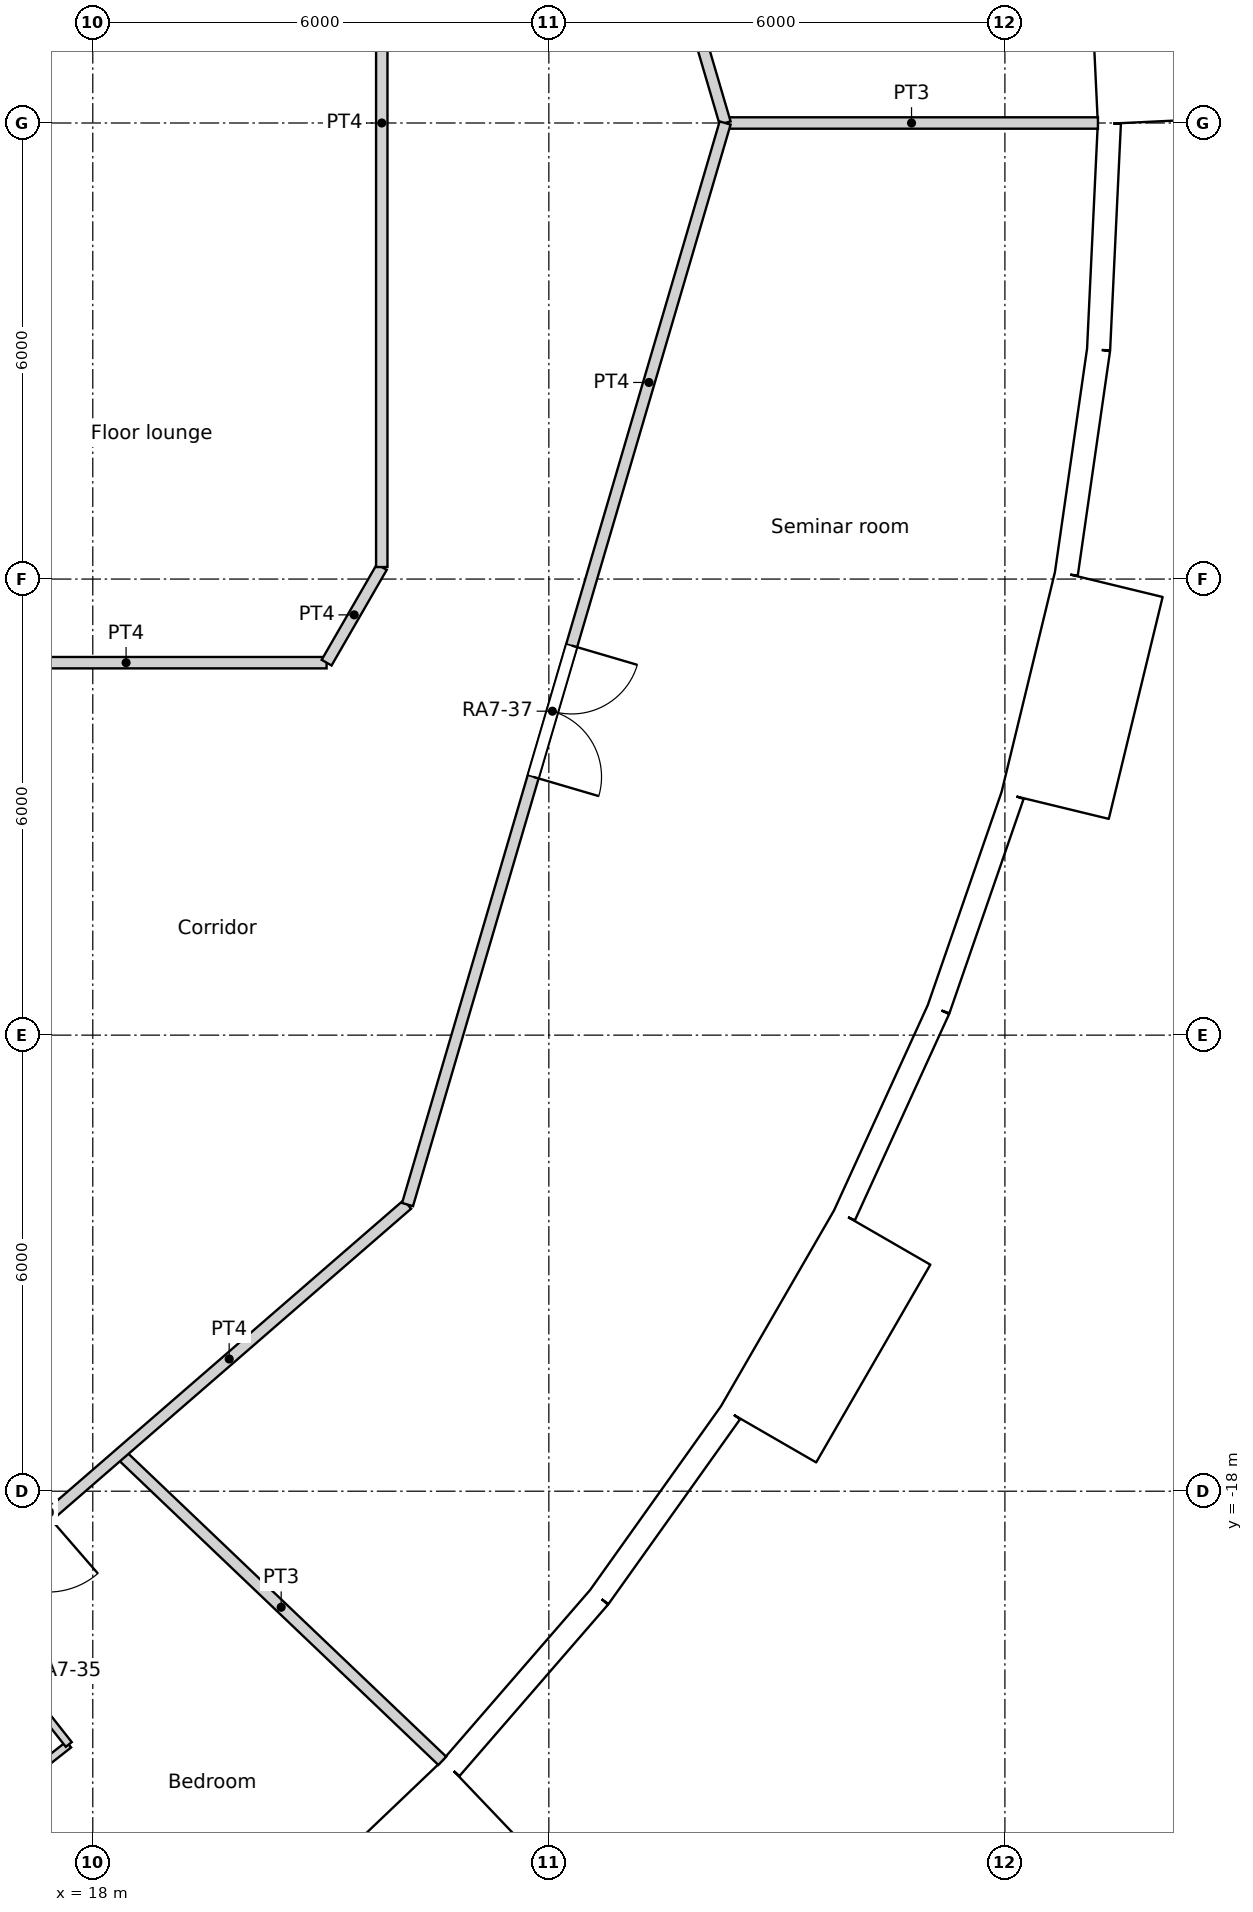
"""IFC4 building model, lengths in metres.
Left out: names, types, materials, properties, quantities, classifications, styles, units other than length and angle.
Written with IfcOpenShell. Run it as: python <this file> out.ifc"""

import sys

from ifc_helpers import new_model, si_unit, direction, frame, frame_2d, origin, origin_2d, place, context, subcontext, project, spatial, rectangle, circle, extrude, element, fill, save


model = new_model("IFC4")
c1 = context("Model", 3, precision=1e-05, world=origin(), true_north=direction((0.0, 1.0)))
c2 = subcontext(c1, "Body", "Model", "MODEL_VIEW")
j1 = project(units=[si_unit("LENGTHUNIT", "METRE"), si_unit("PLANEANGLEUNIT", "RADIAN")], contexts=[c1])
p1 = place(None, origin())
s1 = spatial("IfcSite", under=j1, at=p1, CompositionType="ELEMENT")
p2 = place(p1, origin())
s2 = spatial("IfcBuilding", under=s1, at=p2, CompositionType="ELEMENT")
p3 = place(p2, frame((0.0, 0.0, 93.0)))
s3 = spatial("IfcBuildingStorey", under=s2, at=p3, CompositionType="ELEMENT", Elevation=93.0)
for number, where, z_axis, x_axis in (
    (1, (30.275, 0.0, 0.0), (0.0, 0.0, 1.0), (1.0, 0.0, 0.0)),
    (2, (21.911, -20.892, 0.0), (0.0, 0.0, 1.0), (1.0, 0.0, 0.0)),
    (3, (25.469, -16.368, 0.0), (0.0, 0.0, 1.0), (1.0, 0.0, 0.0)),
    (4, (28.106, -11.252, 0.0), (0.0, 0.0, 1.0), (1.0, 0.0, 0.0)),
    (5, (29.728, -5.729, 0.0), (0.0, 0.0, 1.0), (1.0, 0.0, 0.0)),
):
    element("IfcColumn", number, at=place(p3, frame(where, z_axis=z_axis, x_axis=x_axis)), inside=s3, PredefinedType="COLUMN", context=c2, shape_type="SweptSolid", body=[
        extrude(circle(Radius=0.6, at=origin_2d()), origin(), (0.0, 0.0, 1.0), 3.6),
    ])
for number, where, z_axis, x_axis in (
    (6, (24.548, 0.0, 0.0), (0.0, 0.0, 1.0), (1.0, 0.0, 0.0)),
    (7, (18.805, -15.779, 0.0), (0.0, 0.0, 1.0), (1.0, 0.0, 0.0)),
    (8, (21.937, -11.017, 0.0), (0.0, 0.0, 1.0), (1.0, 0.0, 0.0)),
    (9, (23.886, -5.661, 0.0), (0.0, 0.0, 1.0), (1.0, 0.0, 0.0)),
):
    element("IfcColumn", number, at=place(p3, frame(where, z_axis=z_axis, x_axis=x_axis)), inside=s3, PredefinedType="COLUMN", context=c2, shape_type="SweptSolid", body=[
        extrude(circle(Radius=0.65, at=origin_2d()), origin(), (0.0, 0.0, 1.0), 3.6),
    ])
for number, where, z_axis, x_axis in (
    (10, (18.822, 0.0, 0.0), (0.0, 0.0, 1.0), (1.0, 0.0, 0.0)),
    (11, (17.986, -5.548, 0.0), (0.0, 0.0, 1.0), (1.0, 0.0, 0.0)),
):
    element("IfcColumn", number, at=place(p3, frame(where, z_axis=z_axis, x_axis=x_axis)), inside=s3, PredefinedType="COLUMN", context=c2, shape_type="SweptSolid", body=[
        extrude(circle(Radius=0.7, at=origin_2d()), origin(), (0.0, 0.0, 1.0), 3.6),
    ])
p4 = place(p3, frame((31.949, 0.02, -0.45), z_axis=(0.0, 0.0, 1.0), x_axis=(-0.047607680889, 0.998866111509, 0.0)))
e12 = element("IfcWall", 12, at=p4, inside=s3, PredefinedType="ELEMENTEDWALL", context=c2, shape_type="SweptSolid", body=[
    extrude(rectangle(XDim=3.0, YDim=1.45, at=frame_2d((1.5, 0.0))), origin(), (0.0, 0.0, 1.0), 3.6),
])
p5 = place(p4, frame((1.5, 0.0, 2.0)))
e13 = element("IfcOpeningElement", 13, at=p5, cuts=e12, PredefinedType="OPENING", context=c2, shape_type="SweptSolid", body=[
    extrude(circle(Radius=0.9, at=origin_2d()), frame((0.0, 0.735, 0.0), z_axis=(0.0, -1.0, 0.0), x_axis=(1.0, 0.0, 0.0)), (0.0, 0.0, 1.0), 1.47),
])
p6 = place(p3, frame((20.938, -24.132, -0.45), z_axis=(0.0, 0.0, 1.0), x_axis=(0.723712023899, 0.690102098579, 0.0)))
e14 = element("IfcWall", 14, at=p6, inside=s3, PredefinedType="ELEMENTEDWALL", context=c2, shape_type="SweptSolid", body=[
    extrude(rectangle(XDim=3.0, YDim=1.45, at=frame_2d((1.5, 0.0))), origin(), (0.0, 0.0, 1.0), 3.6),
])
p7 = place(p6, frame((1.5, 0.0, 2.0)))
e15 = element("IfcOpeningElement", 15, at=p7, cuts=e14, PredefinedType="OPENING", context=c2, shape_type="SweptSolid", body=[
    extrude(circle(Radius=0.9, at=origin_2d()), frame((0.0, 0.735, 0.0), z_axis=(0.0, -1.0, 0.0), x_axis=(1.0, 0.0, 0.0)), (0.0, 0.0, 1.0), 1.47),
])
p8 = place(p3, frame((22.711, -21.646, 0.0), z_axis=(0.0, 0.0, 1.0), x_axis=(0.654830712471, 0.755775587066, 0.0)))
e16 = element("IfcWall", 16, at=p8, inside=s3, PredefinedType="SOLIDWALL", context=c2, shape_type="SweptSolid", body=[
    extrude(rectangle(XDim=2.98, YDim=0.3, at=frame_2d((1.49, 0.0))), origin(), (0.0, 0.0, 1.0), 3.15),
])
p9 = place(p8, frame((1.49, 0.0, 1.55)))
e17 = element("IfcOpeningElement", 17, at=p9, cuts=e16, PredefinedType="OPENING", context=c2, shape_type="SweptSolid", body=[
    extrude(circle(Radius=0.9, at=origin_2d()), frame((0.0, 0.16, 0.0), z_axis=(0.0, -1.0, 0.0), x_axis=(1.0, 0.0, 0.0)), (0.0, 0.0, 1.0), 0.32),
])
p10 = place(p3, frame((24.662, -19.394, 0.0), z_axis=(0.0, 0.0, 1.0), x_axis=(0.580113774115, 0.814535456, 0.0)))
e18 = element("IfcWall", 18, at=p10, inside=s3, PredefinedType="SOLIDWALL", context=c2, shape_type="SweptSolid", body=[
    extrude(rectangle(XDim=2.98, YDim=0.3, at=frame_2d((1.49, 0.0))), origin(), (0.0, 0.0, 1.0), 3.15),
])
p11 = place(p10, frame((1.49, 0.0, 1.55)))
e19 = element("IfcOpeningElement", 19, at=p11, cuts=e18, PredefinedType="OPENING", context=c2, shape_type="SweptSolid", body=[
    extrude(circle(Radius=0.9, at=origin_2d()), frame((0.0, 0.16, 0.0), z_axis=(0.0, -1.0, 0.0), x_axis=(1.0, 0.0, 0.0)), (0.0, 0.0, 1.0), 0.32),
])
p12 = place(p3, frame((26.888, -17.256, -0.45), z_axis=(0.0, 0.0, 1.0), x_axis=(0.499990139034, 0.866031096941, 0.0)))
e20 = element("IfcWall", 20, at=p12, inside=s3, PredefinedType="ELEMENTEDWALL", context=c2, shape_type="SweptSolid", body=[
    extrude(rectangle(XDim=3.0, YDim=1.45, at=frame_2d((1.5, 0.0))), origin(), (0.0, 0.0, 1.0), 3.6),
])
p13 = place(p12, frame((1.5, 0.0, 2.0)))
e21 = element("IfcOpeningElement", 21, at=p13, cuts=e20, PredefinedType="OPENING", context=c2, shape_type="SweptSolid", body=[
    extrude(circle(Radius=0.9, at=origin_2d()), frame((0.0, 0.735, 0.0), z_axis=(0.0, -1.0, 0.0), x_axis=(1.0, 0.0, 0.0)), (0.0, 0.0, 1.0), 1.47),
])
p14 = place(p3, frame((27.889, -14.371, 0.0), z_axis=(0.0, 0.0, 1.0), x_axis=(0.415407317162, 0.909635509888, 0.0)))
e22 = element("IfcWall", 22, at=p14, inside=s3, PredefinedType="SOLIDWALL", context=c2, shape_type="SweptSolid", body=[
    extrude(rectangle(XDim=2.98, YDim=0.3, at=frame_2d((1.49, 0.0))), origin(), (0.0, 0.0, 1.0), 3.15),
])
p15 = place(p14, frame((1.49, 0.0, 1.55)))
e23 = element("IfcOpeningElement", 23, at=p15, cuts=e22, PredefinedType="OPENING", context=c2, shape_type="SweptSolid", body=[
    extrude(circle(Radius=0.9, at=origin_2d()), frame((0.0, 0.16, 0.0), z_axis=(0.0, -1.0, 0.0), x_axis=(1.0, 0.0, 0.0)), (0.0, 0.0, 1.0), 0.32),
])
p16 = place(p3, frame((29.127, -11.661, 0.0), z_axis=(0.0, 0.0, 1.0), x_axis=(0.327096492592, 0.944990944154, 0.0)))
e24 = element("IfcWall", 24, at=p16, inside=s3, PredefinedType="SOLIDWALL", context=c2, shape_type="SweptSolid", body=[
    extrude(rectangle(XDim=2.979, YDim=0.3, at=frame_2d((1.49, 0.0))), origin(), (0.0, 0.0, 1.0), 3.15),
])
p17 = place(p16, frame((1.49, 0.0, 1.55)))
e25 = element("IfcOpeningElement", 25, at=p17, cuts=e24, PredefinedType="OPENING", context=c2, shape_type="SweptSolid", body=[
    extrude(circle(Radius=0.9, at=origin_2d()), frame((0.0, 0.16, 0.0), z_axis=(0.0, -1.0, 0.0), x_axis=(1.0, 0.0, 0.0)), (0.0, 0.0, 1.0), 0.32),
])
p18 = place(p3, frame((30.661, -8.982, -0.45), z_axis=(0.0, 0.0, 1.0), x_axis=(0.235751415068, 0.971813392732, 0.0)))
e26 = element("IfcWall", 26, at=p18, inside=s3, PredefinedType="ELEMENTEDWALL", context=c2, shape_type="SweptSolid", body=[
    extrude(rectangle(XDim=3.0, YDim=1.45, at=frame_2d((1.5, 0.0))), origin(), (0.0, 0.0, 1.0), 3.6),
])
p19 = place(p18, frame((1.5, 0.0, 2.0)))
e27 = element("IfcOpeningElement", 27, at=p19, cuts=e26, PredefinedType="OPENING", context=c2, shape_type="SweptSolid", body=[
    extrude(circle(Radius=0.9, at=origin_2d()), frame((0.0, 0.735, 0.0), z_axis=(0.0, -1.0, 0.0), x_axis=(1.0, 0.0, 0.0)), (0.0, 0.0, 1.0), 1.47),
])
p20 = place(p3, frame((30.808, -5.932, 0.0), z_axis=(0.0, 0.0, 1.0), x_axis=(0.142327539111, 0.989819615693, 0.0)))
e28 = element("IfcWall", 28, at=p20, inside=s3, PredefinedType="SOLIDWALL", context=c2, shape_type="SweptSolid", body=[
    extrude(rectangle(XDim=2.979, YDim=0.3, at=frame_2d((1.49, 0.0))), origin(), (0.0, 0.0, 1.0), 3.15),
])
p21 = place(p20, frame((1.49, 0.0, 1.55)))
e29 = element("IfcOpeningElement", 29, at=p21, cuts=e28, PredefinedType="OPENING", context=c2, shape_type="SweptSolid", body=[
    extrude(circle(Radius=0.9, at=origin_2d()), frame((0.0, 0.16, 0.0), z_axis=(0.0, -1.0, 0.0), x_axis=(1.0, 0.0, 0.0)), (0.0, 0.0, 1.0), 0.32),
])
p22 = place(p3, frame((31.232, -2.982, 0.0), z_axis=(0.0, 0.0, 1.0), x_axis=(0.047522328113, 0.998870175914, 0.0)))
e30 = element("IfcWall", 30, at=p22, inside=s3, PredefinedType="SOLIDWALL", context=c2, shape_type="SweptSolid", body=[
    extrude(rectangle(XDim=2.98, YDim=0.3, at=frame_2d((1.49, 0.0))), origin(), (0.0, 0.0, 1.0), 3.15),
])
p23 = place(p22, frame((1.49, 0.0, 1.55)))
e31 = element("IfcOpeningElement", 31, at=p23, cuts=e30, PredefinedType="OPENING", context=c2, shape_type="SweptSolid", body=[
    extrude(circle(Radius=0.9, at=origin_2d()), frame((0.0, 0.16, 0.0), z_axis=(0.0, -1.0, 0.0), x_axis=(1.0, 0.0, 0.0)), (0.0, 0.0, 1.0), 0.32),
])
p24 = place(p3, frame((15.8, -7.1, 0.0), z_axis=(0.0, 0.0, 1.0), x_axis=(1.0, 0.0, 0.0)))
e32 = element("IfcWall", 32, at=p24, inside=s3, PredefinedType="PARTITIONING", context=c2, shape_type="SweptSolid", body=[
    extrude(rectangle(XDim=5.276, YDim=0.15, at=frame_2d((2.638, 0.0))), origin(), (0.0, 0.0, 1.0), 3.15),
])
p25 = place(p3, frame((21.076, -7.1, 0.0), z_axis=(0.0, 0.0, 1.0), x_axis=(0.499863102386, 0.866104427234, 0.0)))
e33 = element("IfcWall", 33, at=p25, inside=s3, PredefinedType="PARTITIONING", context=c2, shape_type="SweptSolid", body=[
    extrude(rectangle(XDim=1.453, YDim=0.15, at=frame_2d((0.726, 0.0))), origin(), (0.0, 0.0, 1.0), 3.15),
])
p26 = place(p3, frame((21.802, -5.842, 0.0), z_axis=(0.0, 0.0, 1.0), x_axis=(0.0, 1.0, 0.0)))
e34 = element("IfcWall", 34, at=p26, inside=s3, PredefinedType="PARTITIONING", context=c2, shape_type="SweptSolid", body=[
    extrude(rectangle(XDim=11.684, YDim=0.15, at=frame_2d((5.842, 0.0))), origin(), (0.0, 0.0, 1.0), 3.15),
])
p27 = place(p3, frame((22.14, 14.229, 0.0), z_axis=(0.0, 0.0, 1.0), x_axis=(0.281780364869, -0.959478934617, 0.0)))
e35 = element("IfcWall", 35, at=p27, inside=s3, PredefinedType="PARTITIONING", context=c2, shape_type="SweptSolid", body=[
    extrude(rectangle(XDim=14.83, YDim=0.15, at=frame_2d((7.415, 0.0))), origin(), (0.0, 0.0, 1.0), 3.15),
])
p28 = place(p27, frame((9.764, 0.0, 0.0)))
e36 = element("IfcOpeningElement", 36, at=p28, cuts=e35, PredefinedType="OPENING", context=c2, shape_type="SweptSolid", body=[
    extrude(rectangle(XDim=1.8, YDim=2.1, at=frame_2d((0.9, 1.05))), frame((0.0, 0.075, 0.0), z_axis=(0.0, -1.0, 0.0), x_axis=(1.0, 0.0, 0.0)), (0.0, 0.0, 1.0), 0.15),
])
p29 = place(p27, frame((0.554, 0.0, 0.0)))
e37 = element("IfcOpeningElement", 37, at=p29, cuts=e35, PredefinedType="OPENING", context=c2, shape_type="SweptSolid", body=[
    extrude(rectangle(XDim=1.8, YDim=2.1, at=frame_2d((0.9, 1.05))), frame((0.0, 0.075, 0.0), z_axis=(0.0, -1.0, 0.0), x_axis=(1.0, 0.0, 0.0)), (0.0, 0.0, 1.0), 0.15),
])
p30 = place(p3, frame((13.247, -21.939, 0.0), z_axis=(0.0, 0.0, 1.0), x_axis=(0.755420750547, 0.655240024451, 0.0)))
e38 = element("IfcWall", 38, at=p30, inside=s3, PredefinedType="PARTITIONING", context=c2, shape_type="SweptSolid", body=[
    extrude(rectangle(XDim=11.771, YDim=0.15, at=frame_2d((5.885, 0.0))), origin(), (0.0, 0.0, 1.0), 3.15),
])
p31 = place(p30, frame((4.513, 0.0, 0.0)))
e39 = element("IfcOpeningElement", 39, at=p31, cuts=e38, PredefinedType="OPENING", context=c2, shape_type="SweptSolid", body=[
    extrude(rectangle(XDim=1.0, YDim=2.1, at=frame_2d((0.5, 1.05))), frame((0.0, 0.075, 0.0), z_axis=(0.0, -1.0, 0.0), x_axis=(1.0, 0.0, 0.0)), (0.0, 0.0, 1.0), 0.15),
])
p32 = place(p3, frame((22.141, -14.229, 0.0), z_axis=(0.0, 0.0, 1.0), x_axis=(0.281730446162, 0.959493593363, 0.0)))
e40 = element("IfcWall", 40, at=p32, inside=s3, PredefinedType="PARTITIONING", context=c2, shape_type="SweptSolid", body=[
    extrude(rectangle(XDim=14.83, YDim=0.15, at=frame_2d((7.415, 0.0))), origin(), (0.0, 0.0, 1.0), 3.15),
])
p33 = place(p32, frame((5.865, 0.0, 0.0)))
e41 = element("IfcOpeningElement", 41, at=p33, cuts=e40, PredefinedType="OPENING", context=c2, shape_type="SweptSolid", body=[
    extrude(rectangle(XDim=1.8, YDim=2.1, at=frame_2d((0.9, 1.05))), frame((0.0, 0.075, 0.0), z_axis=(0.0, -1.0, 0.0), x_axis=(1.0, 0.0, 0.0)), (0.0, 0.0, 1.0), 0.15),
])
p34 = place(p3, frame((26.319, 0.0, 0.0), z_axis=(0.0, 0.0, 1.0), x_axis=(1.0, 0.0, 0.0)))
e42 = element("IfcWall", 42, at=p34, inside=s3, PredefinedType="PARTITIONING", context=c2, shape_type="SweptSolid", body=[
    extrude(rectangle(XDim=4.905, YDim=0.15, at=frame_2d((2.453, 0.0))), origin(), (0.0, 0.0, 1.0), 3.15),
])
p35 = place(p3, frame((14.715, -20.664, 0.0), z_axis=(0.0, 0.0, 1.0), x_axis=(0.57995989616, -0.814645026282, 0.0)))
e43 = element("IfcWall", 43, at=p35, inside=s3, PredefinedType="PARTITIONING", context=c2, shape_type="SweptSolid", body=[
    extrude(rectangle(XDim=5.857, YDim=0.15, at=frame_2d((2.928, 0.0))), origin(), (0.0, 0.0, 1.0), 3.15),
])
p36 = place(p3, frame((16.086, -22.589, 0.0), z_axis=(0.0, 0.0, 1.0), x_axis=(0.785984904201, 0.618245687707, 0.0)))
e44 = element("IfcWall", 44, at=p36, inside=s3, PredefinedType="PARTITIONING", context=c2, shape_type="SweptSolid", body=[
    extrude(rectangle(XDim=2.033, YDim=0.1, at=frame_2d((1.017, 0.0))), origin(), (0.0, 0.0, 1.0), 3.15),
])
p37 = place(p3, frame((16.168, -19.404, 0.0), z_axis=(0.0, 0.0, 1.0), x_axis=(0.618142414415, -0.786066126672, 0.0)))
e45 = element("IfcWall", 45, at=p37, inside=s3, PredefinedType="PARTITIONING", context=c2, shape_type="SweptSolid", body=[
    extrude(rectangle(XDim=2.453, YDim=0.1, at=frame_2d((1.226, 0.0))), origin(), (0.0, 0.0, 1.0), 3.15),
])
p38 = place(p37, frame((0.777, 0.0, 0.0)))
e46 = element("IfcOpeningElement", 46, at=p38, cuts=e45, PredefinedType="OPENING", context=c2, shape_type="SweptSolid", body=[
    extrude(rectangle(XDim=0.9, YDim=2.04, at=frame_2d((0.45, 1.02))), frame((0.0, 0.05, 0.0), z_axis=(0.0, -1.0, 0.0), x_axis=(1.0, 0.0, 0.0)), (0.0, 0.0, 1.0), 0.1),
])
p39 = place(p3, frame((18.359, -17.506, 0.0), z_axis=(0.0, 0.0, 1.0), x_axis=(0.723808715798, -0.690000683286, 0.0)))
e47 = element("IfcWall", 47, at=p39, inside=s3, PredefinedType="PARTITIONING", context=c2, shape_type="SweptSolid", body=[
    extrude(rectangle(XDim=5.856, YDim=0.15, at=frame_2d((2.928, 0.0))), origin(), (0.0, 0.0, 1.0), 3.15),
])
p40 = place(p5, origin())
e48 = element("IfcWindow", 48, at=p40, inside=s3, PartitioningType="SINGLE_PANEL", PredefinedType="WINDOW", context=c2, shape_type="SweptSolid", body=[
    extrude(circle(Radius=0.9, at=origin_2d()), frame((0.0, 0.695, 0.0), z_axis=(0.0, -1.0, 0.0), x_axis=(1.0, 0.0, 0.0)), (0.0, 0.0, 1.0), 0.1),
])
fill(e13, e48)
p41 = place(p7, origin())
e49 = element("IfcWindow", 49, at=p41, inside=s3, PartitioningType="SINGLE_PANEL", PredefinedType="WINDOW", context=c2, shape_type="SweptSolid", body=[
    extrude(circle(Radius=0.9, at=origin_2d()), frame((0.0, 0.695, 0.0), z_axis=(0.0, -1.0, 0.0), x_axis=(1.0, 0.0, 0.0)), (0.0, 0.0, 1.0), 0.1),
])
fill(e15, e49)
p42 = place(p9, origin())
e50 = element("IfcWindow", 50, at=p42, inside=s3, PartitioningType="SINGLE_PANEL", PredefinedType="WINDOW", context=c2, shape_type="SweptSolid", body=[
    extrude(circle(Radius=0.9, at=origin_2d()), frame((0.0, 0.12, 0.0), z_axis=(0.0, -1.0, 0.0), x_axis=(1.0, 0.0, 0.0)), (0.0, 0.0, 1.0), 0.1),
])
fill(e17, e50)
p43 = place(p11, origin())
e51 = element("IfcWindow", 51, at=p43, inside=s3, PartitioningType="SINGLE_PANEL", PredefinedType="WINDOW", context=c2, shape_type="SweptSolid", body=[
    extrude(circle(Radius=0.9, at=origin_2d()), frame((0.0, 0.12, 0.0), z_axis=(0.0, -1.0, 0.0), x_axis=(1.0, 0.0, 0.0)), (0.0, 0.0, 1.0), 0.1),
])
fill(e19, e51)
p44 = place(p13, origin())
e52 = element("IfcWindow", 52, at=p44, inside=s3, PartitioningType="SINGLE_PANEL", PredefinedType="WINDOW", context=c2, shape_type="SweptSolid", body=[
    extrude(circle(Radius=0.9, at=origin_2d()), frame((0.0, 0.695, 0.0), z_axis=(0.0, -1.0, 0.0), x_axis=(1.0, 0.0, 0.0)), (0.0, 0.0, 1.0), 0.1),
])
fill(e21, e52)
p45 = place(p15, origin())
e53 = element("IfcWindow", 53, at=p45, inside=s3, PartitioningType="SINGLE_PANEL", PredefinedType="WINDOW", context=c2, shape_type="SweptSolid", body=[
    extrude(circle(Radius=0.9, at=origin_2d()), frame((0.0, 0.12, 0.0), z_axis=(0.0, -1.0, 0.0), x_axis=(1.0, 0.0, 0.0)), (0.0, 0.0, 1.0), 0.1),
])
fill(e23, e53)
p46 = place(p17, origin())
e54 = element("IfcWindow", 54, at=p46, inside=s3, PartitioningType="SINGLE_PANEL", PredefinedType="WINDOW", context=c2, shape_type="SweptSolid", body=[
    extrude(circle(Radius=0.9, at=origin_2d()), frame((0.0, 0.12, 0.0), z_axis=(0.0, -1.0, 0.0), x_axis=(1.0, 0.0, 0.0)), (0.0, 0.0, 1.0), 0.1),
])
fill(e25, e54)
p47 = place(p19, origin())
e55 = element("IfcWindow", 55, at=p47, inside=s3, PartitioningType="SINGLE_PANEL", PredefinedType="WINDOW", context=c2, shape_type="SweptSolid", body=[
    extrude(circle(Radius=0.9, at=origin_2d()), frame((0.0, 0.695, 0.0), z_axis=(0.0, -1.0, 0.0), x_axis=(1.0, 0.0, 0.0)), (0.0, 0.0, 1.0), 0.1),
])
fill(e27, e55)
p48 = place(p21, origin())
e56 = element("IfcWindow", 56, at=p48, inside=s3, PartitioningType="SINGLE_PANEL", PredefinedType="WINDOW", context=c2, shape_type="SweptSolid", body=[
    extrude(circle(Radius=0.9, at=origin_2d()), frame((0.0, 0.12, 0.0), z_axis=(0.0, -1.0, 0.0), x_axis=(1.0, 0.0, 0.0)), (0.0, 0.0, 1.0), 0.1),
])
fill(e29, e56)
p49 = place(p23, origin())
e57 = element("IfcWindow", 57, at=p49, inside=s3, PartitioningType="SINGLE_PANEL", PredefinedType="WINDOW", context=c2, shape_type="SweptSolid", body=[
    extrude(circle(Radius=0.9, at=origin_2d()), frame((0.0, 0.12, 0.0), z_axis=(0.0, -1.0, 0.0), x_axis=(1.0, 0.0, 0.0)), (0.0, 0.0, 1.0), 0.1),
])
fill(e31, e57)
p50 = place(p33, origin())
e58 = element("IfcDoor", 58, at=p50, inside=s3, OperationType="DOUBLE_DOOR_SINGLE_SWING", PredefinedType="DOOR", context=c2, shape_type="SweptSolid", body=[
    extrude(rectangle(XDim=1.8, YDim=2.1, at=frame_2d((0.9, 1.05))), frame((0.0, 0.025, 0.0), z_axis=(0.0, -1.0, 0.0), x_axis=(1.0, 0.0, 0.0)), (0.0, 0.0, 1.0), 0.05),
])
fill(e41, e58)
save(model, sys.argv[1])
